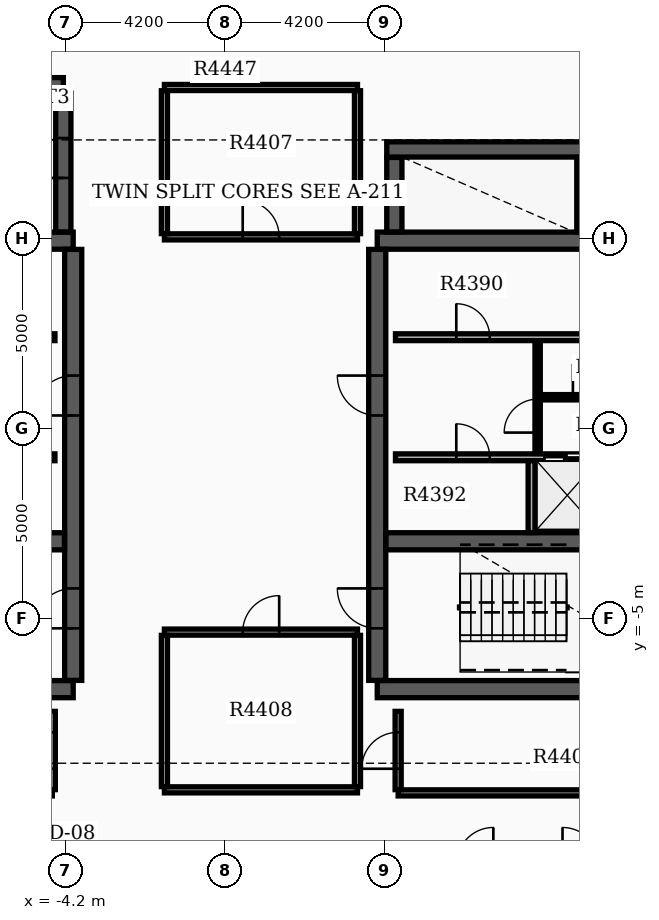
"""IFC4 building model, lengths in metres.
Left out: names, types, materials, properties, quantities, classifications, styles, units other than length and angle.
Written with IfcOpenShell. Run it as: python <this file> out.ifc"""

import sys

from ifc_helpers import new_model, si_unit, direction, frame, frame_2d, origin, place, context, subcontext, project, spatial, rectangle, extrude, element, fill, save


model = new_model("IFC4")
c1 = context("Model", 3, precision=1e-05, world=origin(), true_north=direction((0.0, 1.0)))
c2 = subcontext(c1, "Body", "Model", "MODEL_VIEW")
j1 = project(units=[si_unit("LENGTHUNIT", "METRE"), si_unit("PLANEANGLEUNIT", "RADIAN")], contexts=[c1])
p1 = place(None, origin())
s1 = spatial("IfcSite", under=j1, at=p1, CompositionType="ELEMENT")
p2 = place(p1, origin())
s2 = spatial("IfcBuilding", under=s1, at=p2, CompositionType="ELEMENT")
p3 = place(p2, frame((0.0, 0.0, 277.2)))
s3 = spatial("IfcBuildingStorey", under=s2, at=p3, CompositionType="ELEMENT", Elevation=277.2)
for number, where, z_axis, x_axis in (
    (1, (-12.4, -6.85, 0.0), (0.0, 0.0, 1.0), (1.0, 0.0, 0.0)),
    (2, (-12.4, 4.95, 0.0), (0.0, 0.0, 1.0), (1.0, 0.0, 0.0)),
):
    element("IfcWall", number, at=place(p3, frame(where, z_axis=z_axis, x_axis=x_axis)), inside=s3, PredefinedType="SHEAR", context=c2, shape_type="SweptSolid", body=[
        extrude(rectangle(XDim=8.4, YDim=0.45, at=frame_2d((4.2, 0.0))), origin(), (0.0, 0.0, 1.0), 3.7),
    ])
p4 = place(p3, frame((-4.0, -6.62, 0.0), z_axis=(0.0, 0.0, 1.0), x_axis=(0.0, 1.0, 0.0)))
e3 = element("IfcWall", 3, at=p4, inside=s3, PredefinedType="SHEAR", context=c2, shape_type="SweptSolid", body=[
    extrude(rectangle(XDim=11.34, YDim=0.45, at=frame_2d((5.67, 0.0))), origin(), (0.0, 0.0, 1.0), 3.7),
])
p5 = place(p4, frame((1.37, 0.0, 0.0)))
e4 = element("IfcOpeningElement", 4, at=p5, cuts=e3, PredefinedType="OPENING", context=c2, shape_type="SweptSolid", body=[
    extrude(rectangle(XDim=1.05, YDim=2.15, at=frame_2d((0.525, 1.075))), frame((0.0, 0.235, 0.0), z_axis=(0.0, -1.0, 0.0), x_axis=(1.0, 0.0, 0.0)), (0.0, 0.0, 1.0), 0.47),
])
p6 = place(p4, frame((6.97, 0.0, 0.0)))
e5 = element("IfcOpeningElement", 5, at=p6, cuts=e3, PredefinedType="OPENING", context=c2, shape_type="SweptSolid", body=[
    extrude(rectangle(XDim=1.05, YDim=2.15, at=frame_2d((0.525, 1.075))), frame((0.0, 0.235, 0.0), z_axis=(0.0, -1.0, 0.0), x_axis=(1.0, 0.0, 0.0)), (0.0, 0.0, 1.0), 0.47),
])
p7 = place(p3, frame((-12.17, -2.96, 0.0), z_axis=(0.0, 0.0, 1.0), x_axis=(1.0, 0.0, 0.0)))
e6 = element("IfcWall", 6, at=p7, inside=s3, PredefinedType="SHEAR", context=c2, shape_type="SweptSolid", body=[
    extrude(rectangle(XDim=7.94, YDim=0.45, at=frame_2d((3.97, 0.0))), origin(), (0.0, 0.0, 1.0), 3.7),
])
for number, where, z_axis, x_axis in (
    (7, (4.0, -6.85, 0.0), (0.0, 0.0, 1.0), (1.0, 0.0, 0.0)),
    (8, (4.0, 4.95, 0.0), (0.0, 0.0, 1.0), (1.0, 0.0, 0.0)),
):
    element("IfcWall", number, at=place(p3, frame(where, z_axis=z_axis, x_axis=x_axis)), inside=s3, PredefinedType="SHEAR", context=c2, shape_type="SweptSolid", body=[
        extrude(rectangle(XDim=8.4, YDim=0.45, at=frame_2d((4.2, 0.0))), origin(), (0.0, 0.0, 1.0), 3.7),
    ])
p8 = place(p3, frame((4.0, -6.62, 0.0), z_axis=(0.0, 0.0, 1.0), x_axis=(0.0, 1.0, 0.0)))
e9 = element("IfcWall", 9, at=p8, inside=s3, PredefinedType="SHEAR", context=c2, shape_type="SweptSolid", body=[
    extrude(rectangle(XDim=11.34, YDim=0.45, at=frame_2d((5.67, 0.0))), origin(), (0.0, 0.0, 1.0), 3.7),
])
p9 = place(p8, frame((1.37, 0.0, 0.0)))
e10 = element("IfcOpeningElement", 10, at=p9, cuts=e9, PredefinedType="OPENING", context=c2, shape_type="SweptSolid", body=[
    extrude(rectangle(XDim=1.05, YDim=2.15, at=frame_2d((0.525, 1.075))), frame((0.0, 0.235, 0.0), z_axis=(0.0, -1.0, 0.0), x_axis=(1.0, 0.0, 0.0)), (0.0, 0.0, 1.0), 0.47),
])
p10 = place(p8, frame((6.97, 0.0, 0.0)))
e11 = element("IfcOpeningElement", 11, at=p10, cuts=e9, PredefinedType="OPENING", context=c2, shape_type="SweptSolid", body=[
    extrude(rectangle(XDim=1.05, YDim=2.15, at=frame_2d((0.525, 1.075))), frame((0.0, 0.235, 0.0), z_axis=(0.0, -1.0, 0.0), x_axis=(1.0, 0.0, 0.0)), (0.0, 0.0, 1.0), 0.47),
])
p11 = place(p3, frame((4.23, -2.96, 0.0), z_axis=(0.0, 0.0, 1.0), x_axis=(1.0, 0.0, 0.0)))
e12 = element("IfcWall", 12, at=p11, inside=s3, PredefinedType="SHEAR", context=c2, shape_type="SweptSolid", body=[
    extrude(rectangle(XDim=7.94, YDim=0.45, at=frame_2d((3.97, 0.0))), origin(), (0.0, 0.0, 1.0), 3.7),
])
p12 = place(p3, frame((-12.22, 9.04, 0.0), z_axis=(0.0, 0.0, 1.0), x_axis=(1.0, 0.0, 0.0)))
e13 = element("IfcWall", 13, at=p12, inside=s3, PredefinedType="SHEAR", context=c2, shape_type="SweptSolid", body=[
    extrude(rectangle(XDim=7.96, YDim=0.4, at=frame_2d((3.98, 0.0))), origin(), (0.0, 0.0, 1.0), 3.7),
])
p13 = place(p3, frame((-4.26, 5.18, 0.0), z_axis=(0.0, 0.0, 1.0), x_axis=(0.0, 1.0, 0.0)))
e14 = element("IfcWall", 14, at=p13, inside=s3, PredefinedType="SHEAR", context=c2, shape_type="SweptSolid", body=[
    extrude(rectangle(XDim=3.655, YDim=0.4, at=frame_2d((1.828, 0.0))), origin(), (0.0, 0.0, 1.0), 3.7),
])
p14 = place(p13, frame((1.42, 0.0, 0.0)))
e15 = element("IfcOpeningElement", 15, at=p14, cuts=e14, PredefinedType="OPENING", context=c2, shape_type="SweptSolid", body=[
    extrude(rectangle(XDim=1.05, YDim=2.15, at=frame_2d((0.525, 1.075))), frame((0.0, 0.21, 0.0), z_axis=(0.0, -1.0, 0.0), x_axis=(1.0, 0.0, 0.0)), (0.0, 0.0, 1.0), 0.42),
])
p15 = place(p3, frame((4.45, 5.18, 0.0), z_axis=(0.0, 0.0, 1.0), x_axis=(0.0, 1.0, 0.0)))
e16 = element("IfcWall", 16, at=p15, inside=s3, PredefinedType="SHEAR", context=c2, shape_type="SweptSolid", body=[
    extrude(rectangle(XDim=1.96, YDim=0.4, at=frame_2d((0.98, 0.0))), origin(), (0.0, 0.0, 1.0), 3.7),
])
p16 = place(p3, frame((4.25, 7.35, 0.0), z_axis=(0.0, 0.0, 1.0), x_axis=(1.0, 0.0, 0.0)))
e17 = element("IfcWall", 17, at=p16, inside=s3, PredefinedType="SHEAR", context=c2, shape_type="SweptSolid", body=[
    extrude(rectangle(XDim=5.4, YDim=0.4, at=frame_2d((2.7, 0.0))), origin(), (0.0, 0.0, 1.0), 3.7),
])
p17 = place(p3, frame((9.45, 5.18, 0.0), z_axis=(0.0, 0.0, 1.0), x_axis=(0.0, 1.0, 0.0)))
e18 = element("IfcWall", 18, at=p17, inside=s3, PredefinedType="SHEAR", context=c2, shape_type="SweptSolid", body=[
    extrude(rectangle(XDim=1.96, YDim=0.4, at=frame_2d((0.98, 0.0))), origin(), (0.0, 0.0, 1.0), 3.7),
])
p18 = place(p3, frame((-11.9, 2.41, 0.0), z_axis=(0.0, 0.0, 1.0), x_axis=(1.0, 0.0, 0.0)))
e19 = element("IfcWall", 19, at=p18, inside=s3, PredefinedType="SOLIDWALL", context=c2, shape_type="SweptSolid", body=[
    extrude(rectangle(XDim=7.42, YDim=0.18, at=frame_2d((3.71, 0.0))), origin(), (0.0, 0.0, 1.0), 3.17),
])
p19 = place(p18, frame((0.55, 0.0, 0.0)))
e20 = element("IfcOpeningElement", 20, at=p19, cuts=e19, PredefinedType="OPENING", context=c2, shape_type="SweptSolid", body=[
    extrude(rectangle(XDim=1.1, YDim=2.15, at=frame_2d((0.55, 1.075))), frame((0.0, 0.1, 0.0), z_axis=(0.0, -1.0, 0.0), x_axis=(1.0, 0.0, 0.0)), (0.0, 0.0, 1.0), 0.2),
])
p20 = place(p18, frame((4.9, 0.0, 0.0)))
e21 = element("IfcOpeningElement", 21, at=p20, cuts=e19, PredefinedType="OPENING", context=c2, shape_type="SweptSolid", body=[
    extrude(rectangle(XDim=0.88, YDim=2.1, at=frame_2d((0.44, 1.05))), frame((0.0, 0.1, 0.0), z_axis=(0.0, -1.0, 0.0), x_axis=(1.0, 0.0, 0.0)), (0.0, 0.0, 1.0), 0.2),
])
p21 = place(p3, frame((4.48, 2.41, 0.0), z_axis=(0.0, 0.0, 1.0), x_axis=(1.0, 0.0, 0.0)))
e22 = element("IfcWall", 22, at=p21, inside=s3, PredefinedType="SOLIDWALL", context=c2, shape_type="SweptSolid", body=[
    extrude(rectangle(XDim=7.42, YDim=0.18, at=frame_2d((3.71, 0.0))), origin(), (0.0, 0.0, 1.0), 3.17),
])
p22 = place(p21, frame((5.67, 0.0, 0.0)))
e23 = element("IfcOpeningElement", 23, at=p22, cuts=e22, PredefinedType="OPENING", context=c2, shape_type="SweptSolid", body=[
    extrude(rectangle(XDim=1.1, YDim=2.15, at=frame_2d((0.55, 1.075))), frame((0.0, 0.1, 0.0), z_axis=(0.0, -1.0, 0.0), x_axis=(1.0, 0.0, 0.0)), (0.0, 0.0, 1.0), 0.2),
])
p23 = place(p21, frame((1.6, 0.0, 0.0)))
e24 = element("IfcOpeningElement", 24, at=p23, cuts=e22, PredefinedType="OPENING", context=c2, shape_type="SweptSolid", body=[
    extrude(rectangle(XDim=0.88, YDim=2.1, at=frame_2d((0.44, 1.05))), frame((0.0, 0.1, 0.0), z_axis=(0.0, -1.0, 0.0), x_axis=(1.0, 0.0, 0.0)), (0.0, 0.0, 1.0), 0.2),
])
p24 = place(p3, frame((-11.9, -0.75, 0.0), z_axis=(0.0, 0.0, 1.0), x_axis=(1.0, 0.0, 0.0)))
e25 = element("IfcWall", 25, at=p24, inside=s3, PredefinedType="SOLIDWALL", context=c2, shape_type="SweptSolid", body=[
    extrude(rectangle(XDim=7.42, YDim=0.18, at=frame_2d((3.71, 0.0))), origin(), (0.0, 0.0, 1.0), 3.17),
])
p25 = place(p24, frame((5.75, 0.0, 0.0)))
e26 = element("IfcOpeningElement", 26, at=p25, cuts=e25, PredefinedType="OPENING", context=c2, shape_type="SweptSolid", body=[
    extrude(rectangle(XDim=1.1, YDim=2.15, at=frame_2d((0.55, 1.075))), frame((0.0, 0.1, 0.0), z_axis=(0.0, -1.0, 0.0), x_axis=(1.0, 0.0, 0.0)), (0.0, 0.0, 1.0), 0.2),
])
p26 = place(p24, frame((1.6, 0.0, 0.0)))
e27 = element("IfcOpeningElement", 27, at=p26, cuts=e25, PredefinedType="OPENING", context=c2, shape_type="SweptSolid", body=[
    extrude(rectangle(XDim=0.88, YDim=2.1, at=frame_2d((0.44, 1.05))), frame((0.0, 0.1, 0.0), z_axis=(0.0, -1.0, 0.0), x_axis=(1.0, 0.0, 0.0)), (0.0, 0.0, 1.0), 0.2),
])
p27 = place(p3, frame((4.48, -0.75, 0.0), z_axis=(0.0, 0.0, 1.0), x_axis=(1.0, 0.0, 0.0)))
e28 = element("IfcWall", 28, at=p27, inside=s3, PredefinedType="SOLIDWALL", context=c2, shape_type="SweptSolid", body=[
    extrude(rectangle(XDim=7.42, YDim=0.18, at=frame_2d((3.71, 0.0))), origin(), (0.0, 0.0, 1.0), 3.17),
])
p28 = place(p27, frame((3.92, 0.0, 0.0)))
e29 = element("IfcOpeningElement", 29, at=p28, cuts=e28, PredefinedType="OPENING", context=c2, shape_type="SweptSolid", body=[
    extrude(rectangle(XDim=1.1, YDim=2.15, at=frame_2d((0.55, 1.075))), frame((0.0, 0.1, 0.0), z_axis=(0.0, -1.0, 0.0), x_axis=(1.0, 0.0, 0.0)), (0.0, 0.0, 1.0), 0.2),
])
p29 = place(p27, frame((5.82, 0.0, 0.0)))
e30 = element("IfcOpeningElement", 30, at=p29, cuts=e28, PredefinedType="OPENING", context=c2, shape_type="SweptSolid", body=[
    extrude(rectangle(XDim=1.1, YDim=2.15, at=frame_2d((0.55, 1.075))), frame((0.0, 0.1, 0.0), z_axis=(0.0, -1.0, 0.0), x_axis=(1.0, 0.0, 0.0)), (0.0, 0.0, 1.0), 0.2),
])
p30 = place(p27, frame((1.6, 0.0, 0.0)))
e31 = element("IfcOpeningElement", 31, at=p30, cuts=e28, PredefinedType="OPENING", context=c2, shape_type="SweptSolid", body=[
    extrude(rectangle(XDim=0.88, YDim=2.1, at=frame_2d((0.44, 1.05))), frame((0.0, 0.1, 0.0), z_axis=(0.0, -1.0, 0.0), x_axis=(1.0, 0.0, 0.0)), (0.0, 0.0, 1.0), 0.2),
])
p31 = place(p3, frame((8.06, -2.73, 0.0), z_axis=(0.0, 0.0, 1.0), x_axis=(0.0, 1.0, 0.0)))
e32 = element("IfcWall", 32, at=p31, inside=s3, PredefinedType="SOLIDWALL", context=c2, shape_type="SweptSolid", body=[
    extrude(rectangle(XDim=1.89, YDim=0.18, at=frame_2d((0.945, 0.0))), origin(), (0.0, 0.0, 1.0), 3.17),
])
p32 = place(p3, frame((8.22, -0.65, 0.0), z_axis=(0.0, 0.0, 1.0), x_axis=(0.0, 1.0, 0.0)))
e33 = element("IfcWall", 33, at=p32, inside=s3, PredefinedType="SOLIDWALL", context=c2, shape_type="SweptSolid", body=[
    extrude(rectangle(XDim=2.96, YDim=0.14, at=frame_2d((1.48, 0.0))), origin(), (0.0, 0.0, 1.0), 3.17),
])
p33 = place(p32, frame((0.55, 0.0, 0.0)))
e34 = element("IfcOpeningElement", 34, at=p33, cuts=e33, PredefinedType="OPENING", context=c2, shape_type="SweptSolid", body=[
    extrude(rectangle(XDim=0.88, YDim=2.1, at=frame_2d((0.44, 1.05))), frame((0.0, 0.08, 0.0), z_axis=(0.0, -1.0, 0.0), x_axis=(1.0, 0.0, 0.0)), (0.0, 0.0, 1.0), 0.16),
])
p34 = place(p3, frame((8.298, 0.83, 0.0), z_axis=(0.0, 0.0, 1.0), x_axis=(1.0, 0.0, 0.0)))
e35 = element("IfcWall", 35, at=p34, inside=s3, PredefinedType="PARTITIONING", context=c2, shape_type="SweptSolid", body=[
    extrude(rectangle(XDim=3.552, YDim=0.14, at=frame_2d((1.776, 0.0))), origin(), (0.0, 0.0, 1.0), 3.17),
])
p35 = place(p34, frame((0.85, 0.0, 0.0)))
e36 = element("IfcOpeningElement", 36, at=p35, cuts=e35, PredefinedType="OPENING", context=c2, shape_type="SweptSolid", body=[
    extrude(rectangle(XDim=0.88, YDim=2.1, at=frame_2d((0.44, 1.05))), frame((0.0, 0.08, 0.0), z_axis=(0.0, -1.0, 0.0), x_axis=(1.0, 0.0, 0.0)), (0.0, 0.0, 1.0), 0.16),
])
p36 = place(p3, frame((-1.6, 5.05, 0.0), z_axis=(0.0, 0.0, 1.0), x_axis=(1.0, 0.0, 0.0)))
e37 = element("IfcWall", 37, at=p36, inside=s3, PredefinedType="PARTITIONING", context=c2, shape_type="SweptSolid", body=[
    extrude(rectangle(XDim=5.08, YDim=0.16, at=frame_2d((2.54, 0.0))), origin(), (0.0, 0.0, 1.0), 3.17),
])
p37 = place(p36, frame((2.06, 0.0, 0.0)))
e38 = element("IfcOpeningElement", 38, at=p37, cuts=e37, PredefinedType="OPENING", context=c2, shape_type="SweptSolid", body=[
    extrude(rectangle(XDim=0.96, YDim=2.15, at=frame_2d((0.48, 1.075))), frame((0.0, 0.09, 0.0), z_axis=(0.0, -1.0, 0.0), x_axis=(1.0, 0.0, 0.0)), (0.0, 0.0, 1.0), 0.18),
])
p38 = place(p3, frame((-1.6, 8.98, 0.0), z_axis=(0.0, 0.0, 1.0), x_axis=(1.0, 0.0, 0.0)))
e39 = element("IfcWall", 39, at=p38, inside=s3, PredefinedType="PARTITIONING", context=c2, shape_type="SweptSolid", body=[
    extrude(rectangle(XDim=5.08, YDim=0.16, at=frame_2d((2.54, 0.0))), origin(), (0.0, 0.0, 1.0), 3.17),
])
for number, where, z_axis, x_axis in (
    (40, (-1.6, 5.135, 0.0), (0.0, 0.0, 1.0), (0.0, 1.0, 0.0)),
    (41, (3.48, 5.135, 0.0), (0.0, 0.0, 1.0), (0.0, 1.0, 0.0)),
):
    element("IfcWall", number, at=place(p3, frame(where, z_axis=z_axis, x_axis=x_axis)), inside=s3, PredefinedType="PARTITIONING", context=c2, shape_type="SweptSolid", body=[
        extrude(rectangle(XDim=3.76, YDim=0.16, at=frame_2d((1.88, 0.0))), origin(), (0.0, 0.0, 1.0), 3.17),
    ])
p39 = place(p3, frame((-1.6, -9.5, 0.0), z_axis=(0.0, 0.0, 1.0), x_axis=(1.0, 0.0, 0.0)))
e42 = element("IfcWall", 42, at=p39, inside=s3, PredefinedType="PARTITIONING", context=c2, shape_type="SweptSolid", body=[
    extrude(rectangle(XDim=5.08, YDim=0.16, at=frame_2d((2.54, 0.0))), origin(), (0.0, 0.0, 1.0), 3.17),
])
p40 = place(p3, frame((-1.6, -5.35, 0.0), z_axis=(0.0, 0.0, 1.0), x_axis=(1.0, 0.0, 0.0)))
e43 = element("IfcWall", 43, at=p40, inside=s3, PredefinedType="PARTITIONING", context=c2, shape_type="SweptSolid", body=[
    extrude(rectangle(XDim=5.08, YDim=0.16, at=frame_2d((2.54, 0.0))), origin(), (0.0, 0.0, 1.0), 3.17),
])
p41 = place(p40, frame((2.06, 0.0, 0.0)))
e44 = element("IfcOpeningElement", 44, at=p41, cuts=e43, PredefinedType="OPENING", context=c2, shape_type="SweptSolid", body=[
    extrude(rectangle(XDim=0.96, YDim=2.15, at=frame_2d((0.48, 1.075))), frame((0.0, 0.09, 0.0), z_axis=(0.0, -1.0, 0.0), x_axis=(1.0, 0.0, 0.0)), (0.0, 0.0, 1.0), 0.18),
])
for number, where, z_axis, x_axis in (
    (45, (-1.6, -9.415, 0.0), (0.0, 0.0, 1.0), (0.0, 1.0, 0.0)),
    (46, (3.48, -9.415, 0.0), (0.0, 0.0, 1.0), (0.0, 1.0, 0.0)),
):
    element("IfcWall", number, at=place(p3, frame(where, z_axis=z_axis, x_axis=x_axis)), inside=s3, PredefinedType="PARTITIONING", context=c2, shape_type="SweptSolid", body=[
        extrude(rectangle(XDim=3.98, YDim=0.16, at=frame_2d((1.99, 0.0))), origin(), (0.0, 0.0, 1.0), 3.17),
    ])
p42 = place(p3, frame((4.55, -9.58, 0.0), z_axis=(0.0, 0.0, 1.0), x_axis=(1.0, 0.0, 0.0)))
e47 = element("IfcWall", 47, at=p42, inside=s3, PredefinedType="PARTITIONING", context=c2, shape_type="SweptSolid", body=[
    extrude(rectangle(XDim=8.1, YDim=0.16, at=frame_2d((4.05, 0.0))), origin(), (0.0, 0.0, 1.0), 3.17),
])
p43 = place(p3, frame((4.55, -9.495, 0.0), z_axis=(0.0, 0.0, 1.0), x_axis=(0.0, 1.0, 0.0)))
e48 = element("IfcWall", 48, at=p43, inside=s3, PredefinedType="PARTITIONING", context=c2, shape_type="SweptSolid", body=[
    extrude(rectangle(XDim=2.06, YDim=0.16, at=frame_2d((1.03, 0.0))), origin(), (0.0, 0.0, 1.0), 3.17),
])
p44 = place(p43, frame((0.55, 0.0, 0.0)))
e49 = element("IfcOpeningElement", 49, at=p44, cuts=e48, PredefinedType="OPENING", context=c2, shape_type="SweptSolid", body=[
    extrude(rectangle(XDim=0.96, YDim=2.15, at=frame_2d((0.48, 1.075))), frame((0.0, 0.09, 0.0), z_axis=(0.0, -1.0, 0.0), x_axis=(1.0, 0.0, 0.0)), (0.0, 0.0, 1.0), 0.18),
])
p45 = place(p3, frame((-4.55, -9.495, 0.0), z_axis=(0.0, 0.0, 1.0), x_axis=(0.0, 1.0, 0.0)))
e50 = element("IfcWall", 50, at=p45, inside=s3, PredefinedType="PARTITIONING", context=c2, shape_type="SweptSolid", body=[
    extrude(rectangle(XDim=2.06, YDim=0.16, at=frame_2d((1.03, 0.0))), origin(), (0.0, 0.0, 1.0), 3.17),
])
p46 = place(p45, frame((0.55, 0.0, 0.0)))
e51 = element("IfcOpeningElement", 51, at=p46, cuts=e50, PredefinedType="OPENING", context=c2, shape_type="SweptSolid", body=[
    extrude(rectangle(XDim=0.96, YDim=2.15, at=frame_2d((0.48, 1.075))), frame((0.0, 0.09, 0.0), z_axis=(0.0, -1.0, 0.0), x_axis=(1.0, 0.0, 0.0)), (0.0, 0.0, 1.0), 0.18),
])
p47 = place(p5, origin())
e52 = element("IfcDoor", 52, at=p47, inside=s3, OperationType="SINGLE_SWING_LEFT", PredefinedType="DOOR", context=c2, shape_type="SweptSolid", body=[
    extrude(rectangle(XDim=1.05, YDim=2.15, at=frame_2d((0.525, 1.075))), frame((0.0, 0.025, 0.0), z_axis=(0.0, -1.0, 0.0), x_axis=(1.0, 0.0, 0.0)), (0.0, 0.0, 1.0), 0.05),
])
fill(e4, e52)
p48 = place(p9, origin())
e53 = element("IfcDoor", 53, at=p48, inside=s3, OperationType="SINGLE_SWING_RIGHT", PredefinedType="DOOR", context=c2, shape_type="SweptSolid", body=[
    extrude(rectangle(XDim=1.05, YDim=2.15, at=frame_2d((0.525, 1.075))), frame((0.0, 0.025, 0.0), z_axis=(0.0, -1.0, 0.0), x_axis=(1.0, 0.0, 0.0)), (0.0, 0.0, 1.0), 0.05),
])
fill(e10, e53)
p49 = place(p6, origin())
e54 = element("IfcDoor", 54, at=p49, inside=s3, OperationType="SINGLE_SWING_LEFT", PredefinedType="DOOR", context=c2, shape_type="SweptSolid", body=[
    extrude(rectangle(XDim=1.05, YDim=2.15, at=frame_2d((0.525, 1.075))), frame((0.0, 0.025, 0.0), z_axis=(0.0, -1.0, 0.0), x_axis=(1.0, 0.0, 0.0)), (0.0, 0.0, 1.0), 0.05),
])
fill(e5, e54)
p50 = place(p10, origin())
e55 = element("IfcDoor", 55, at=p50, inside=s3, OperationType="SINGLE_SWING_RIGHT", PredefinedType="DOOR", context=c2, shape_type="SweptSolid", body=[
    extrude(rectangle(XDim=1.05, YDim=2.15, at=frame_2d((0.525, 1.075))), frame((0.0, 0.025, 0.0), z_axis=(0.0, -1.0, 0.0), x_axis=(1.0, 0.0, 0.0)), (0.0, 0.0, 1.0), 0.05),
])
fill(e11, e55)
p51 = place(p14, origin())
e56 = element("IfcDoor", 56, at=p51, inside=s3, OperationType="SINGLE_SWING_LEFT", PredefinedType="DOOR", context=c2, shape_type="SweptSolid", body=[
    extrude(rectangle(XDim=1.05, YDim=2.15, at=frame_2d((0.525, 1.075))), frame((0.0, 0.025, 0.0), z_axis=(0.0, -1.0, 0.0), x_axis=(1.0, 0.0, 0.0)), (0.0, 0.0, 1.0), 0.05),
])
fill(e15, e56)
p52 = place(p28, origin())
e57 = element("IfcDoor", 57, at=p52, inside=s3, OperationType="DOUBLE_DOOR_SLIDING", PredefinedType="DOOR", context=c2, shape_type="SweptSolid", body=[
    extrude(rectangle(XDim=1.1, YDim=2.15, at=frame_2d((0.55, 1.075))), frame((0.0, 0.025, 0.0), z_axis=(0.0, -1.0, 0.0), x_axis=(1.0, 0.0, 0.0)), (0.0, 0.0, 1.0), 0.05),
])
fill(e29, e57)
p53 = place(p23, origin())
e58 = element("IfcDoor", 58, at=p53, inside=s3, OperationType="SINGLE_SWING_LEFT", PredefinedType="DOOR", context=c2, shape_type="SweptSolid", body=[
    extrude(rectangle(XDim=0.88, YDim=2.1, at=frame_2d((0.44, 1.05))), frame((0.0, 0.025, 0.0), z_axis=(0.0, -1.0, 0.0), x_axis=(1.0, 0.0, 0.0)), (0.0, 0.0, 1.0), 0.05),
])
fill(e24, e58)
p54 = place(p30, origin())
e59 = element("IfcDoor", 59, at=p54, inside=s3, OperationType="SINGLE_SWING_LEFT", PredefinedType="DOOR", context=c2, shape_type="SweptSolid", body=[
    extrude(rectangle(XDim=0.88, YDim=2.1, at=frame_2d((0.44, 1.05))), frame((0.0, 0.025, 0.0), z_axis=(0.0, -1.0, 0.0), x_axis=(1.0, 0.0, 0.0)), (0.0, 0.0, 1.0), 0.05),
])
fill(e31, e59)
p55 = place(p33, origin())
e60 = element("IfcDoor", 60, at=p55, inside=s3, OperationType="SINGLE_SWING_LEFT", PredefinedType="DOOR", context=c2, shape_type="SweptSolid", body=[
    extrude(rectangle(XDim=0.88, YDim=2.1, at=frame_2d((0.44, 1.05))), frame((0.0, 0.025, 0.0), z_axis=(0.0, -1.0, 0.0), x_axis=(1.0, 0.0, 0.0)), (0.0, 0.0, 1.0), 0.05),
])
fill(e34, e60)
p56 = place(p35, origin())
e61 = element("IfcDoor", 61, at=p56, inside=s3, OperationType="SINGLE_SWING_LEFT", PredefinedType="DOOR", context=c2, shape_type="SweptSolid", body=[
    extrude(rectangle(XDim=0.88, YDim=2.1, at=frame_2d((0.44, 1.05))), frame((0.0, 0.025, 0.0), z_axis=(0.0, -1.0, 0.0), x_axis=(1.0, 0.0, 0.0)), (0.0, 0.0, 1.0), 0.05),
])
fill(e36, e61)
p57 = place(p37, origin())
e62 = element("IfcDoor", 62, at=p57, inside=s3, OperationType="SINGLE_SWING_LEFT", PredefinedType="DOOR", context=c2, shape_type="SweptSolid", body=[
    extrude(rectangle(XDim=0.96, YDim=2.15, at=frame_2d((0.48, 1.075))), frame((0.0, 0.025, 0.0), z_axis=(0.0, -1.0, 0.0), x_axis=(1.0, 0.0, 0.0)), (0.0, 0.0, 1.0), 0.05),
])
fill(e38, e62)
p58 = place(p41, origin())
e63 = element("IfcDoor", 63, at=p58, inside=s3, OperationType="SINGLE_SWING_RIGHT", PredefinedType="DOOR", context=c2, shape_type="SweptSolid", body=[
    extrude(rectangle(XDim=0.96, YDim=2.15, at=frame_2d((0.48, 1.075))), frame((0.0, 0.025, 0.0), z_axis=(0.0, -1.0, 0.0), x_axis=(1.0, 0.0, 0.0)), (0.0, 0.0, 1.0), 0.05),
])
fill(e44, e63)
p59 = place(p44, origin())
e64 = element("IfcDoor", 64, at=p59, inside=s3, OperationType="SINGLE_SWING_LEFT", PredefinedType="DOOR", context=c2, shape_type="SweptSolid", body=[
    extrude(rectangle(XDim=0.96, YDim=2.15, at=frame_2d((0.48, 1.075))), frame((0.0, 0.025, 0.0), z_axis=(0.0, -1.0, 0.0), x_axis=(1.0, 0.0, 0.0)), (0.0, 0.0, 1.0), 0.05),
])
fill(e49, e64)
p60 = place(p46, origin())
e65 = element("IfcDoor", 65, at=p60, inside=s3, OperationType="SINGLE_SWING_RIGHT", PredefinedType="DOOR", context=c2, shape_type="SweptSolid", body=[
    extrude(rectangle(XDim=0.96, YDim=2.15, at=frame_2d((0.48, 1.075))), frame((0.0, 0.025, 0.0), z_axis=(0.0, -1.0, 0.0), x_axis=(1.0, 0.0, 0.0)), (0.0, 0.0, 1.0), 0.05),
])
fill(e51, e65)
save(model, sys.argv[1])
